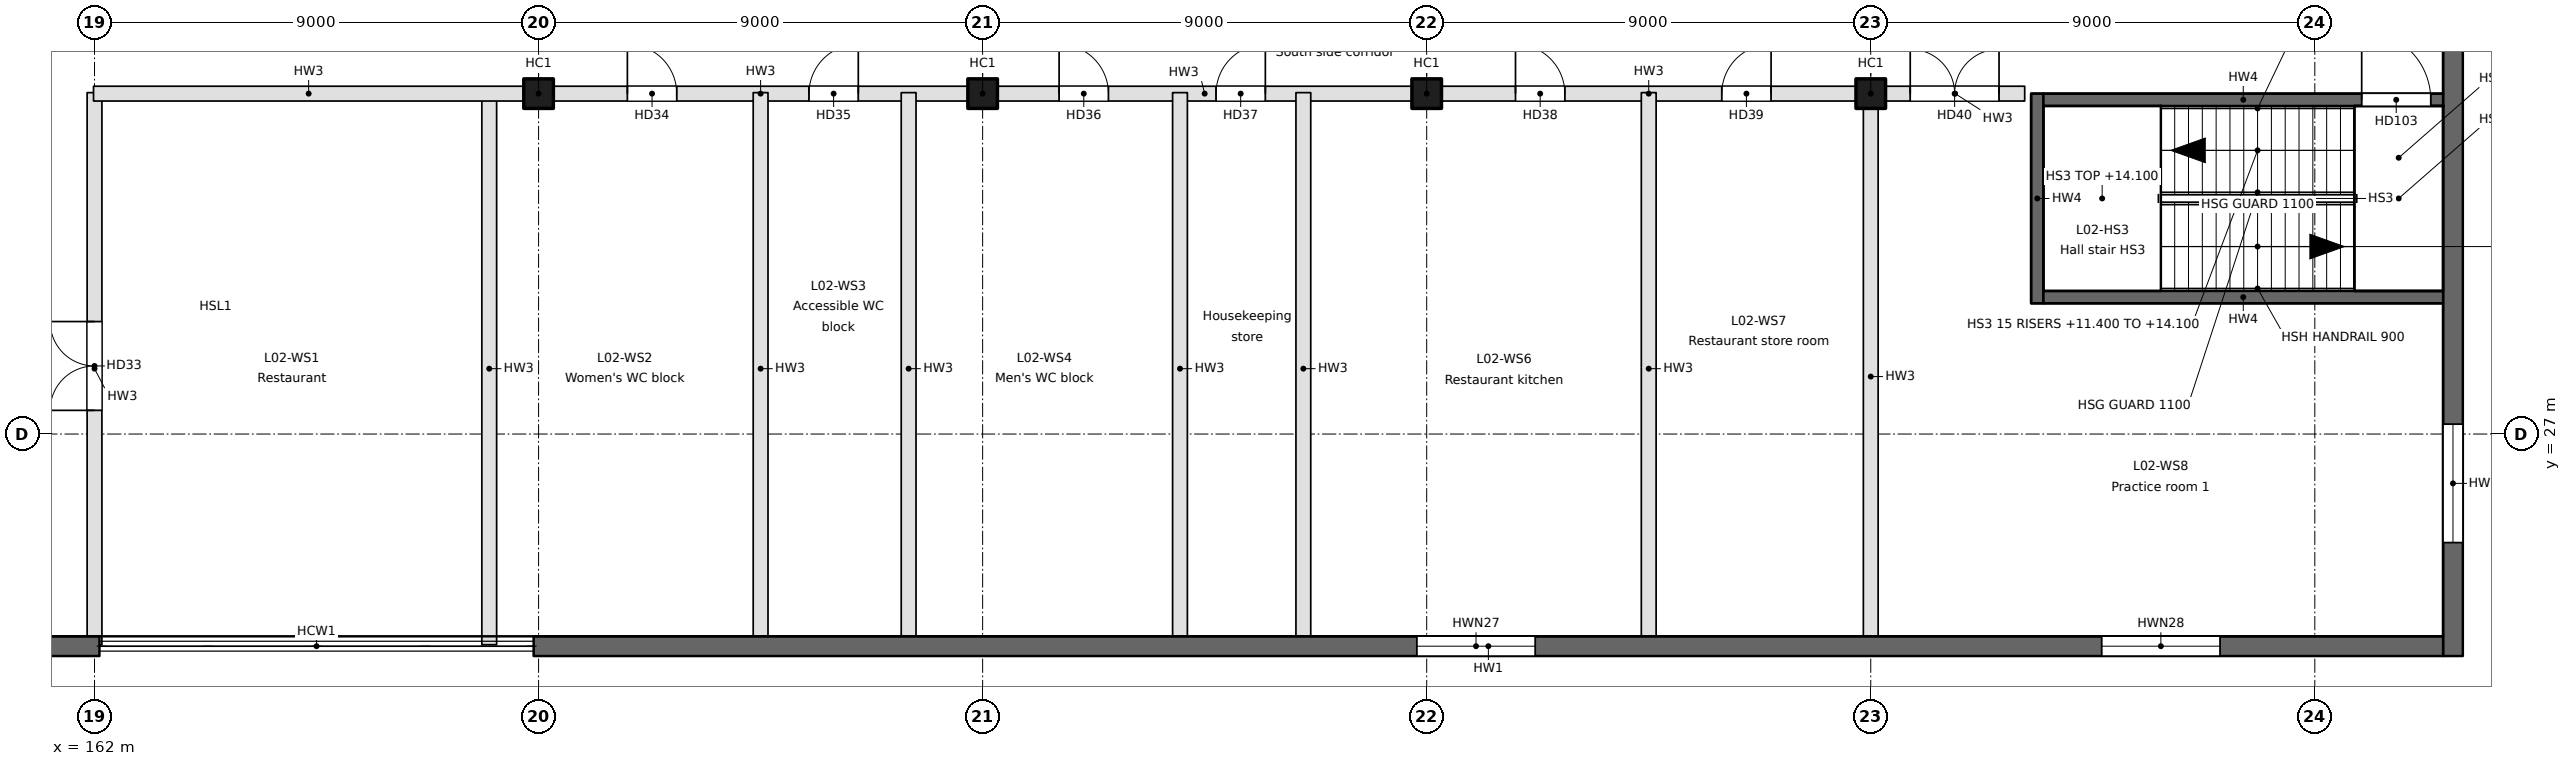
"""IFC4 building model, lengths in metres.
Left out: names, types, materials, properties, quantities, classifications, styles, units other than length and angle.
Written with IfcOpenShell. Run it as: python <this file> out.ifc"""

import sys

from ifc_helpers import new_model, si_unit, direction, frame, frame_2d, origin, origin_2d, place, context, subcontext, project, spatial, rectangle, extrude, element, fill, save


model = new_model("IFC4")
c1 = context("Model", 3, precision=1e-05, world=origin(), true_north=direction((0.0, 1.0)))
c2 = subcontext(c1, "Body", "Model", "MODEL_VIEW")
j1 = project(units=[si_unit("LENGTHUNIT", "METRE"), si_unit("PLANEANGLEUNIT", "RADIAN")], contexts=[c1])
p1 = place(None, origin())
s1 = spatial("IfcSite", under=j1, at=p1, CompositionType="ELEMENT")
p2 = place(p1, origin())
s2 = spatial("IfcBuilding", under=s1, at=p2, CompositionType="ELEMENT")
p3 = place(p2, frame((0.0, 0.0, 11.4)))
s3 = spatial("IfcBuildingStorey", under=s2, at=p3, CompositionType="ELEMENT", Elevation=11.4)
for number, where, z_axis, x_axis in (
    (1, (171.0, 33.9, 0.0), (0.0, 0.0, 1.0), (1.0, 0.0, 0.0)),
    (2, (180.0, 33.9, 0.0), (0.0, 0.0, 1.0), (1.0, 0.0, 0.0)),
    (3, (189.0, 33.9, 0.0), (0.0, 0.0, 1.0), (1.0, 0.0, 0.0)),
    (4, (198.0, 33.9, 0.0), (0.0, 0.0, 1.0), (1.0, 0.0, 0.0)),
):
    element("IfcColumn", number, at=place(p3, frame(where, z_axis=z_axis, x_axis=x_axis)), inside=s3, PredefinedType="COLUMN", context=c2, shape_type="SweptSolid", body=[
        extrude(rectangle(XDim=0.6, YDim=0.6, at=origin_2d()), origin(), (0.0, 0.0, 1.0), 5.4),
    ])
p4 = place(p3, frame((209.8, 76.5, -0.35), z_axis=(0.0, 0.0, 1.0), x_axis=(0.0, -1.0, 0.0)))
e5 = element("IfcWall", 5, at=p4, inside=s3, PredefinedType="SOLIDWALL", context=c2, shape_type="SweptSolid", body=[
    extrude(rectangle(XDim=54.0, YDim=0.4, at=frame_2d((27.0, 0.0))), origin(), (0.0, 0.0, 1.0), 5.4),
])
p5 = place(p4, frame((49.3, 0.0, 1.25)))
e6 = element("IfcOpeningElement", 6, at=p5, cuts=e5, PredefinedType="OPENING", context=c2, shape_type="SweptSolid", body=[
    extrude(rectangle(XDim=2.4, YDim=1.8, at=frame_2d((1.2, 0.9))), frame((0.0, 0.2, 0.0), z_axis=(0.0, -1.0, 0.0), x_axis=(1.0, 0.0, 0.0)), (0.0, 0.0, 1.0), 0.4),
])
p6 = place(p4, frame((2.3, 0.0, 1.25)))
e7 = element("IfcOpeningElement", 7, at=p6, cuts=e5, PredefinedType="OPENING", context=c2, shape_type="SweptSolid", body=[
    extrude(rectangle(XDim=2.4, YDim=1.8, at=frame_2d((1.2, 0.9))), frame((0.0, 0.2, 0.0), z_axis=(0.0, -1.0, 0.0), x_axis=(1.0, 0.0, 0.0)), (0.0, 0.0, 1.0), 0.4),
])
p7 = place(p3, frame((209.6, 22.7, -0.35), z_axis=(0.0, 0.0, 1.0), x_axis=(-1.0, 0.0, 0.0)))
e8 = element("IfcWall", 8, at=p7, inside=s3, PredefinedType="SOLIDWALL", context=c2, shape_type="SweptSolid", body=[
    extrude(rectangle(XDim=38.7, YDim=0.4, at=frame_2d((19.35, 0.0))), origin(), (0.0, 0.0, 1.0), 5.4),
])
p8 = place(p7, frame((18.4, 0.0, 1.25)))
e9 = element("IfcOpeningElement", 9, at=p8, cuts=e8, PredefinedType="OPENING", context=c2, shape_type="SweptSolid", body=[
    extrude(rectangle(XDim=2.4, YDim=1.8, at=frame_2d((1.2, 0.9))), frame((0.0, 0.2, 0.0), z_axis=(0.0, -1.0, 0.0), x_axis=(1.0, 0.0, 0.0)), (0.0, 0.0, 1.0), 0.4),
])
p9 = place(p7, frame((4.52, 0.0, 1.25)))
e10 = element("IfcOpeningElement", 10, at=p9, cuts=e8, PredefinedType="OPENING", context=c2, shape_type="SweptSolid", body=[
    extrude(rectangle(XDim=2.4, YDim=1.8, at=frame_2d((1.2, 0.9))), frame((0.0, 0.2, 0.0), z_axis=(0.0, -1.0, 0.0), x_axis=(1.0, 0.0, 0.0)), (0.0, 0.0, 1.0), 0.4),
])
p10 = place(p3, frame((162.1, 22.7, -0.35), z_axis=(0.0, 0.0, 1.0), x_axis=(-1.0, 0.0, 0.0)))
e11 = element("IfcWall", 11, at=p10, inside=s3, PredefinedType="SOLIDWALL", context=c2, shape_type="SweptSolid", body=[
    extrude(rectangle(XDim=11.7, YDim=0.4, at=frame_2d((5.85, 0.0))), origin(), (0.0, 0.0, 1.0), 5.4),
])
p11 = place(p10, frame((2.9, 0.0, 1.25)))
e12 = element("IfcOpeningElement", 12, at=p11, cuts=e11, PredefinedType="OPENING", context=c2, shape_type="SweptSolid", body=[
    extrude(rectangle(XDim=2.4, YDim=1.8, at=frame_2d((1.2, 0.9))), frame((0.0, 0.2, 0.0), z_axis=(0.0, -1.0, 0.0), x_axis=(1.0, 0.0, 0.0)), (0.0, 0.0, 1.0), 0.4),
])
p12 = place(p3, frame((162.0, 22.73, 0.0), z_axis=(0.0, 0.0, 1.0), x_axis=(0.0, 1.0, 0.0)))
e13 = element("IfcWall", 13, at=p12, inside=s3, PredefinedType="PARTITIONING", context=c2, shape_type="SweptSolid", body=[
    extrude(rectangle(XDim=11.19, YDim=0.3, at=frame_2d((5.595, 0.0))), origin(), (0.0, 0.0, 1.0), 5.05),
])
p13 = place(p12, frame((4.75, 0.0, 0.0)))
e14 = element("IfcOpeningElement", 14, at=p13, cuts=e13, PredefinedType="OPENING", context=c2, shape_type="SweptSolid", body=[
    extrude(rectangle(XDim=1.8, YDim=2.1, at=frame_2d((0.9, 1.05))), frame((0.0, 0.15, 0.0), z_axis=(0.0, -1.0, 0.0), x_axis=(1.0, 0.0, 0.0)), (0.0, 0.0, 1.0), 0.3),
])
p14 = place(p3, frame((170.0, 22.73, 0.0), z_axis=(0.0, 0.0, 1.0), x_axis=(0.0, 1.0, 0.0)))
e15 = element("IfcWall", 15, at=p14, inside=s3, PredefinedType="PARTITIONING", context=c2, shape_type="SweptSolid", body=[
    extrude(rectangle(XDim=11.19, YDim=0.3, at=frame_2d((5.595, 0.0))), origin(), (0.0, 0.0, 1.0), 5.05),
])
p15 = place(p3, frame((161.98, 33.9, 0.0), z_axis=(0.0, 0.0, 1.0), x_axis=(1.0, 0.0, 0.0)))
e16 = element("IfcWall", 16, at=p15, inside=s3, PredefinedType="PARTITIONING", context=c2, shape_type="SweptSolid", body=[
    extrude(rectangle(XDim=8.72, YDim=0.3, at=frame_2d((4.36, 0.0))), origin(), (0.0, 0.0, 1.0), 5.05),
])
p16 = place(p3, frame((171.3, 33.9, 0.0), z_axis=(0.0, 0.0, 1.0), x_axis=(1.0, 0.0, 0.0)))
e17 = element("IfcWall", 17, at=p16, inside=s3, PredefinedType="PARTITIONING", context=c2, shape_type="SweptSolid", body=[
    extrude(rectangle(XDim=8.4, YDim=0.3, at=frame_2d((4.2, 0.0))), origin(), (0.0, 0.0, 1.0), 5.05),
])
p17 = place(p16, frame((1.5, 0.0, 0.0)))
e18 = element("IfcOpeningElement", 18, at=p17, cuts=e17, PredefinedType="OPENING", context=c2, shape_type="SweptSolid", body=[
    extrude(rectangle(XDim=1.0, YDim=2.1, at=frame_2d((0.5, 1.05))), frame((0.0, 0.15, 0.0), z_axis=(0.0, -1.0, 0.0), x_axis=(1.0, 0.0, 0.0)), (0.0, 0.0, 1.0), 0.3),
])
p18 = place(p16, frame((5.18, 0.0, 0.0)))
e19 = element("IfcOpeningElement", 19, at=p18, cuts=e17, PredefinedType="OPENING", context=c2, shape_type="SweptSolid", body=[
    extrude(rectangle(XDim=1.0, YDim=2.1, at=frame_2d((0.5, 1.05))), frame((0.0, 0.15, 0.0), z_axis=(0.0, -1.0, 0.0), x_axis=(1.0, 0.0, 0.0)), (0.0, 0.0, 1.0), 0.3),
])
p19 = place(p3, frame((180.3, 33.9, 0.0), z_axis=(0.0, 0.0, 1.0), x_axis=(1.0, 0.0, 0.0)))
e20 = element("IfcWall", 20, at=p19, inside=s3, PredefinedType="PARTITIONING", context=c2, shape_type="SweptSolid", body=[
    extrude(rectangle(XDim=8.4, YDim=0.3, at=frame_2d((4.2, 0.0))), origin(), (0.0, 0.0, 1.0), 5.05),
])
p20 = place(p19, frame((1.25, 0.0, 0.0)))
e21 = element("IfcOpeningElement", 21, at=p20, cuts=e20, PredefinedType="OPENING", context=c2, shape_type="SweptSolid", body=[
    extrude(rectangle(XDim=1.0, YDim=2.1, at=frame_2d((0.5, 1.05))), frame((0.0, 0.15, 0.0), z_axis=(0.0, -1.0, 0.0), x_axis=(1.0, 0.0, 0.0)), (0.0, 0.0, 1.0), 0.3),
])
p21 = place(p19, frame((4.43, 0.0, 0.0)))
e22 = element("IfcOpeningElement", 22, at=p21, cuts=e20, PredefinedType="OPENING", context=c2, shape_type="SweptSolid", body=[
    extrude(rectangle(XDim=1.0, YDim=2.1, at=frame_2d((0.5, 1.05))), frame((0.0, 0.15, 0.0), z_axis=(0.0, -1.0, 0.0), x_axis=(1.0, 0.0, 0.0)), (0.0, 0.0, 1.0), 0.3),
])
p22 = place(p3, frame((189.3, 33.9, 0.0), z_axis=(0.0, 0.0, 1.0), x_axis=(1.0, 0.0, 0.0)))
e23 = element("IfcWall", 23, at=p22, inside=s3, PredefinedType="PARTITIONING", context=c2, shape_type="SweptSolid", body=[
    extrude(rectangle(XDim=8.4, YDim=0.3, at=frame_2d((4.2, 0.0))), origin(), (0.0, 0.0, 1.0), 5.05),
])
p23 = place(p22, frame((1.5, 0.0, 0.0)))
e24 = element("IfcOpeningElement", 24, at=p23, cuts=e23, PredefinedType="OPENING", context=c2, shape_type="SweptSolid", body=[
    extrude(rectangle(XDim=1.0, YDim=2.1, at=frame_2d((0.5, 1.05))), frame((0.0, 0.15, 0.0), z_axis=(0.0, -1.0, 0.0), x_axis=(1.0, 0.0, 0.0)), (0.0, 0.0, 1.0), 0.3),
])
p24 = place(p22, frame((5.68, 0.0, 0.0)))
e25 = element("IfcOpeningElement", 25, at=p24, cuts=e23, PredefinedType="OPENING", context=c2, shape_type="SweptSolid", body=[
    extrude(rectangle(XDim=1.0, YDim=2.1, at=frame_2d((0.5, 1.05))), frame((0.0, 0.15, 0.0), z_axis=(0.0, -1.0, 0.0), x_axis=(1.0, 0.0, 0.0)), (0.0, 0.0, 1.0), 0.3),
])
p25 = place(p3, frame((198.3, 33.9, 0.0), z_axis=(0.0, 0.0, 1.0), x_axis=(1.0, 0.0, 0.0)))
e26 = element("IfcWall", 26, at=p25, inside=s3, PredefinedType="PARTITIONING", context=c2, shape_type="SweptSolid", body=[
    extrude(rectangle(XDim=2.82, YDim=0.3, at=frame_2d((1.41, 0.0))), origin(), (0.0, 0.0, 1.0), 5.05),
])
p26 = place(p25, frame((0.5, 0.0, 0.0)))
e27 = element("IfcOpeningElement", 27, at=p26, cuts=e26, PredefinedType="OPENING", context=c2, shape_type="SweptSolid", body=[
    extrude(rectangle(XDim=1.8, YDim=2.1, at=frame_2d((0.9, 1.05))), frame((0.0, 0.15, 0.0), z_axis=(0.0, -1.0, 0.0), x_axis=(1.0, 0.0, 0.0)), (0.0, 0.0, 1.0), 0.3),
])
for number, where, z_axis, x_axis in (
    (28, (175.5, 22.73, 0.0), (0.0, 0.0, 1.0), (0.0, 1.0, 0.0)),
    (29, (178.5, 22.73, 0.0), (0.0, 0.0, 1.0), (0.0, 1.0, 0.0)),
    (30, (184.0, 22.73, 0.0), (0.0, 0.0, 1.0), (0.0, 1.0, 0.0)),
    (31, (186.5, 22.73, 0.0), (0.0, 0.0, 1.0), (0.0, 1.0, 0.0)),
    (32, (193.5, 22.73, 0.0), (0.0, 0.0, 1.0), (0.0, 1.0, 0.0)),
):
    element("IfcWall", number, at=place(p3, frame(where, z_axis=z_axis, x_axis=x_axis)), inside=s3, PredefinedType="PARTITIONING", context=c2, shape_type="SweptSolid", body=[
        extrude(rectangle(XDim=11.19, YDim=0.3, at=frame_2d((5.595, 0.0))), origin(), (0.0, 0.0, 1.0), 5.05),
    ])
p27 = place(p3, frame((198.0, 22.73, 0.0), z_axis=(0.0, 0.0, 1.0), x_axis=(0.0, 1.0, 0.0)))
e33 = element("IfcWall", 33, at=p27, inside=s3, PredefinedType="PARTITIONING", context=c2, shape_type="SweptSolid", body=[
    extrude(rectangle(XDim=10.87, YDim=0.3, at=frame_2d((5.435, 0.0))), origin(), (0.0, 0.0, 1.0), 5.05),
])
p28 = place(p3, frame((201.375, 29.65, -0.35), z_axis=(0.0, 0.0, 1.0), x_axis=(0.0, 1.0, 0.0)))
e34 = element("IfcWall", 34, at=p28, inside=s3, PredefinedType="SOLIDWALL", context=c2, shape_type="SweptSolid", body=[
    extrude(rectangle(XDim=4.25, YDim=0.25, at=frame_2d((2.125, 0.0))), origin(), (0.0, 0.0, 1.0), 5.4),
])
p29 = place(p3, frame((209.6, 29.775, -0.35), z_axis=(0.0, 0.0, 1.0), x_axis=(-1.0, 0.0, 0.0)))
e35 = element("IfcWall", 35, at=p29, inside=s3, PredefinedType="SOLIDWALL", context=c2, shape_type="SweptSolid", body=[
    extrude(rectangle(XDim=8.1, YDim=0.25, at=frame_2d((4.05, 0.0))), origin(), (0.0, 0.0, 1.0), 5.4),
])
p30 = place(p3, frame((201.5, 33.775, -0.35), z_axis=(0.0, 0.0, 1.0), x_axis=(1.0, 0.0, 0.0)))
e36 = element("IfcWall", 36, at=p30, inside=s3, PredefinedType="SOLIDWALL", context=c2, shape_type="SweptSolid", body=[
    extrude(rectangle(XDim=8.1, YDim=0.25, at=frame_2d((4.05, 0.0))), origin(), (0.0, 0.0, 1.0), 5.4),
])
p31 = place(p30, frame((6.45, 0.0, 0.35)))
e37 = element("IfcOpeningElement", 37, at=p31, cuts=e36, PredefinedType="OPENING", context=c2, shape_type="SweptSolid", body=[
    extrude(rectangle(XDim=1.4, YDim=2.1, at=frame_2d((0.7, 1.05))), frame((0.0, 0.125, 0.0), z_axis=(0.0, -1.0, 0.0), x_axis=(1.0, 0.0, 0.0)), (0.0, 0.0, 1.0), 0.25),
])
p32 = place(p13, origin())
e38 = element("IfcDoor", 38, at=p32, inside=s3, OperationType="DOUBLE_DOOR_SINGLE_SWING", PredefinedType="DOOR", context=c2, shape_type="SweptSolid", body=[
    extrude(rectangle(XDim=1.8, YDim=2.1, at=frame_2d((0.9, 1.05))), frame((0.0, 0.025, 0.0), z_axis=(0.0, -1.0, 0.0), x_axis=(1.0, 0.0, 0.0)), (0.0, 0.0, 1.0), 0.05),
])
fill(e14, e38)
p33 = place(p17, origin())
e39 = element("IfcDoor", 39, at=p33, inside=s3, OperationType="SINGLE_SWING_LEFT", PredefinedType="DOOR", context=c2, shape_type="SweptSolid", body=[
    extrude(rectangle(XDim=1.0, YDim=2.1, at=frame_2d((0.5, 1.05))), frame((0.0, 0.025, 0.0), z_axis=(0.0, -1.0, 0.0), x_axis=(1.0, 0.0, 0.0)), (0.0, 0.0, 1.0), 0.05),
])
fill(e18, e39)
p34 = place(p18, origin())
e40 = element("IfcDoor", 40, at=p34, inside=s3, OperationType="SINGLE_SWING_RIGHT", PredefinedType="DOOR", context=c2, shape_type="SweptSolid", body=[
    extrude(rectangle(XDim=1.0, YDim=2.1, at=frame_2d((0.5, 1.05))), frame((0.0, 0.025, 0.0), z_axis=(0.0, -1.0, 0.0), x_axis=(1.0, 0.0, 0.0)), (0.0, 0.0, 1.0), 0.05),
])
fill(e19, e40)
p35 = place(p20, origin())
e41 = element("IfcDoor", 41, at=p35, inside=s3, OperationType="SINGLE_SWING_LEFT", PredefinedType="DOOR", context=c2, shape_type="SweptSolid", body=[
    extrude(rectangle(XDim=1.0, YDim=2.1, at=frame_2d((0.5, 1.05))), frame((0.0, 0.025, 0.0), z_axis=(0.0, -1.0, 0.0), x_axis=(1.0, 0.0, 0.0)), (0.0, 0.0, 1.0), 0.05),
])
fill(e21, e41)
p36 = place(p21, origin())
e42 = element("IfcDoor", 42, at=p36, inside=s3, OperationType="SINGLE_SWING_RIGHT", PredefinedType="DOOR", context=c2, shape_type="SweptSolid", body=[
    extrude(rectangle(XDim=1.0, YDim=2.1, at=frame_2d((0.5, 1.05))), frame((0.0, 0.025, 0.0), z_axis=(0.0, -1.0, 0.0), x_axis=(1.0, 0.0, 0.0)), (0.0, 0.0, 1.0), 0.05),
])
fill(e22, e42)
p37 = place(p23, origin())
e43 = element("IfcDoor", 43, at=p37, inside=s3, OperationType="SINGLE_SWING_LEFT", PredefinedType="DOOR", context=c2, shape_type="SweptSolid", body=[
    extrude(rectangle(XDim=1.0, YDim=2.1, at=frame_2d((0.5, 1.05))), frame((0.0, 0.025, 0.0), z_axis=(0.0, -1.0, 0.0), x_axis=(1.0, 0.0, 0.0)), (0.0, 0.0, 1.0), 0.05),
])
fill(e24, e43)
p38 = place(p24, origin())
e44 = element("IfcDoor", 44, at=p38, inside=s3, OperationType="SINGLE_SWING_RIGHT", PredefinedType="DOOR", context=c2, shape_type="SweptSolid", body=[
    extrude(rectangle(XDim=1.0, YDim=2.1, at=frame_2d((0.5, 1.05))), frame((0.0, 0.025, 0.0), z_axis=(0.0, -1.0, 0.0), x_axis=(1.0, 0.0, 0.0)), (0.0, 0.0, 1.0), 0.05),
])
fill(e25, e44)
p39 = place(p26, origin())
e45 = element("IfcDoor", 45, at=p39, inside=s3, OperationType="DOUBLE_DOOR_SINGLE_SWING", PredefinedType="DOOR", context=c2, shape_type="SweptSolid", body=[
    extrude(rectangle(XDim=1.8, YDim=2.1, at=frame_2d((0.9, 1.05))), frame((0.0, 0.025, 0.0), z_axis=(0.0, -1.0, 0.0), x_axis=(1.0, 0.0, 0.0)), (0.0, 0.0, 1.0), 0.05),
])
fill(e27, e45)
p40 = place(p5, origin())
e46 = element("IfcWindow", 46, at=p40, inside=s3, PartitioningType="SINGLE_PANEL", PredefinedType="WINDOW", context=c2, shape_type="SweptSolid", body=[
    extrude(rectangle(XDim=2.4, YDim=1.8, at=frame_2d((1.2, 0.9))), frame((0.0, 0.03, 0.0), z_axis=(0.0, -1.0, 0.0), x_axis=(1.0, 0.0, 0.0)), (0.0, 0.0, 1.0), 0.06),
])
fill(e6, e46)
p41 = place(p8, origin())
e47 = element("IfcWindow", 47, at=p41, inside=s3, PartitioningType="SINGLE_PANEL", PredefinedType="WINDOW", context=c2, shape_type="SweptSolid", body=[
    extrude(rectangle(XDim=2.4, YDim=1.8, at=frame_2d((1.2, 0.9))), frame((0.0, 0.03, 0.0), z_axis=(0.0, -1.0, 0.0), x_axis=(1.0, 0.0, 0.0)), (0.0, 0.0, 1.0), 0.06),
])
fill(e9, e47)
p42 = place(p9, origin())
e48 = element("IfcWindow", 48, at=p42, inside=s3, PartitioningType="SINGLE_PANEL", PredefinedType="WINDOW", context=c2, shape_type="SweptSolid", body=[
    extrude(rectangle(XDim=2.4, YDim=1.8, at=frame_2d((1.2, 0.9))), frame((0.0, 0.03, 0.0), z_axis=(0.0, -1.0, 0.0), x_axis=(1.0, 0.0, 0.0)), (0.0, 0.0, 1.0), 0.06),
])
fill(e10, e48)
p43 = place(p31, origin())
e49 = element("IfcDoor", 49, at=p43, inside=s3, OperationType="SINGLE_SWING_LEFT", PredefinedType="DOOR", context=c2, shape_type="SweptSolid", body=[
    extrude(rectangle(XDim=1.4, YDim=2.1, at=frame_2d((0.7, 1.05))), frame((0.0, 0.025, 0.0), z_axis=(0.0, -1.0, 0.0), x_axis=(1.0, 0.0, 0.0)), (0.0, 0.0, 1.0), 0.05),
])
fill(e37, e49)
save(model, sys.argv[1])
